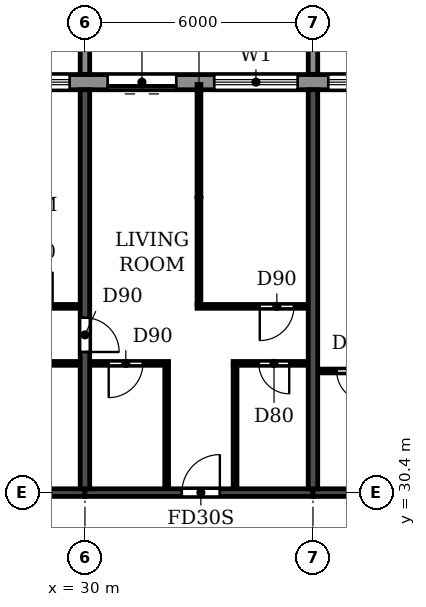
"""IFC4 building model, lengths in metres.
Left out: names, types, materials, properties, quantities, classifications, styles, units other than length and angle.
Written with IfcOpenShell. Run it as: python <this file> out.ifc"""

import sys

from ifc_helpers import new_model, si_unit, direction, frame, frame_2d, origin, place, context, subcontext, project, spatial, polyline, rectangle, outline, extrude, source, transform, mapped, element, fill, save


model = new_model("IFC4")
c1 = context("Model", 3, precision=1e-05, world=origin(), true_north=direction((0.0, 1.0)))
c2 = subcontext(c1, "Body", "Model", "MODEL_VIEW")
j1 = project(units=[si_unit("LENGTHUNIT", "METRE"), si_unit("PLANEANGLEUNIT", "RADIAN")], contexts=[c1])
p1 = place(None, origin())
s1 = spatial("IfcSite", under=j1, at=p1, CompositionType="ELEMENT")
p2 = place(p1, origin())
s2 = spatial("IfcBuilding", under=s1, at=p2, CompositionType="ELEMENT")
p3 = place(p2, frame((0.0, 0.0, 221.4)))
s3 = spatial("IfcBuildingStorey", under=s2, at=p3, CompositionType="ELEMENT", Elevation=221.4)
p4 = place(p3, frame((30.0, 30.5, 0.0), z_axis=(0.0, 0.0, 1.0), x_axis=(0.0, 1.0, 0.0)))
e1 = element("IfcWall", 1, at=p4, inside=s3, PredefinedType="SHEAR", context=c2, shape_type="SweptSolid", body=[
    extrude(rectangle(XDim=10.5, YDim=0.25, at=frame_2d((5.25, 0.0))), origin(), (0.0, 0.0, 1.0), 3.08),
])
p5 = place(p4, frame((3.6, 0.0, 0.0)))
e2 = element("IfcOpeningElement", 2, at=p5, cuts=e1, PredefinedType="OPENING", context=c2, shape_type="SweptSolid", body=[
    extrude(rectangle(XDim=0.9, YDim=2.1, at=frame_2d((0.45, 1.05))), frame((0.0, 0.135, 0.0), z_axis=(0.0, -1.0, 0.0), x_axis=(1.0, 0.0, 0.0)), (0.0, 0.0, 1.0), 0.27),
])
p6 = place(p3, frame((36.0, 30.5, 0.0), z_axis=(0.0, 0.0, 1.0), x_axis=(0.0, 1.0, 0.0)))
e3 = element("IfcWall", 3, at=p6, inside=s3, PredefinedType="SHEAR", context=c2, shape_type="SweptSolid", body=[
    extrude(rectangle(XDim=10.5, YDim=0.25, at=frame_2d((5.25, 0.0))), origin(), (0.0, 0.0, 1.0), 3.08),
])
p7 = place(p3, frame((24.0, 30.4, 0.0), z_axis=(0.0, 0.0, 1.0), x_axis=(1.0, 0.0, 0.0)))
e4 = element("IfcWall", 4, at=p7, inside=s3, PredefinedType="SHEAR", context=c2, shape_type="SweptSolid", body=[
    extrude(rectangle(XDim=6.0, YDim=0.2, at=frame_2d((3.0, 0.0))), origin(), (0.0, 0.0, 1.0), 2.48),
])
p8 = place(p3, frame((30.0, 30.4, 0.0), z_axis=(0.0, 0.0, 1.0), x_axis=(1.0, 0.0, 0.0)))
e5 = element("IfcWall", 5, at=p8, inside=s3, PredefinedType="SHEAR", context=c2, shape_type="SweptSolid", body=[
    extrude(rectangle(XDim=6.0, YDim=0.2, at=frame_2d((3.0, 0.0))), origin(), (0.0, 0.0, 1.0), 2.48),
])
p9 = place(p8, frame((2.55, 0.0, 0.0)))
e6 = element("IfcOpeningElement", 6, at=p9, cuts=e5, PredefinedType="OPENING", context=c2, shape_type="SweptSolid", body=[
    extrude(rectangle(XDim=1.0, YDim=2.1, at=frame_2d((0.5, 1.05))), frame((0.0, 0.11, 0.0), z_axis=(0.0, -1.0, 0.0), x_axis=(1.0, 0.0, 0.0)), (0.0, 0.0, 1.0), 0.22),
])
p10 = place(p3, frame((36.0, 30.4, 0.0), z_axis=(0.0, 0.0, 1.0), x_axis=(1.0, 0.0, 0.0)))
e7 = element("IfcWall", 7, at=p10, inside=s3, PredefinedType="SHEAR", context=c2, shape_type="SweptSolid", body=[
    extrude(rectangle(XDim=6.0, YDim=0.2, at=frame_2d((3.0, 0.0))), origin(), (0.0, 0.0, 1.0), 2.48),
])
p11 = place(p10, frame((2.45, 0.0, 0.0)))
e8 = element("IfcOpeningElement", 8, at=p11, cuts=e7, PredefinedType="OPENING", context=c2, shape_type="SweptSolid", body=[
    extrude(rectangle(XDim=1.0, YDim=2.1, at=frame_2d((0.5, 1.05))), frame((0.0, 0.11, 0.0), z_axis=(0.0, -1.0, 0.0), x_axis=(1.0, 0.0, 0.0)), (0.0, 0.0, 1.0), 0.22),
])
p12 = place(p3, frame((79.317, 41.2, 0.0), z_axis=(0.0, 0.0, 1.0), x_axis=(-1.0, 0.0, 0.0)))
e9 = element("IfcWall", 9, at=p12, inside=s3, PredefinedType="STANDARD", context=c2, shape_type="SweptSolid", body=[
    extrude(rectangle(XDim=56.634, YDim=0.4, at=frame_2d((28.317, 0.0))), origin(), (0.0, 0.0, 1.0), 3.08),
])
p13 = place(p12, frame((52.717, 0.0, 0.9)))
e10 = element("IfcOpeningElement", 10, at=p13, cuts=e9, PredefinedType="OPENING", context=c2, shape_type="SweptSolid", body=[
    extrude(rectangle(XDim=2.2, YDim=1.5, at=frame_2d((1.1, 0.75))), frame((0.0, 0.21, 0.0), z_axis=(0.0, -1.0, 0.0), x_axis=(1.0, 0.0, 0.0)), (0.0, 0.0, 1.0), 0.42),
])
p14 = place(p12, frame((49.717, 0.0, 0.9)))
e11 = element("IfcOpeningElement", 11, at=p14, cuts=e9, PredefinedType="OPENING", context=c2, shape_type="SweptSolid", body=[
    extrude(rectangle(XDim=2.2, YDim=1.5, at=frame_2d((1.1, 0.75))), frame((0.0, 0.21, 0.0), z_axis=(0.0, -1.0, 0.0), x_axis=(1.0, 0.0, 0.0)), (0.0, 0.0, 1.0), 0.42),
])
p15 = place(p12, frame((46.917, 0.0, 0.0)))
e12 = element("IfcOpeningElement", 12, at=p15, cuts=e9, PredefinedType="OPENING", context=c2, shape_type="SweptSolid", body=[
    extrude(rectangle(XDim=1.8, YDim=2.4, at=frame_2d((0.9, 1.2))), frame((0.0, 0.21, 0.0), z_axis=(0.0, -1.0, 0.0), x_axis=(1.0, 0.0, 0.0)), (0.0, 0.0, 1.0), 0.42),
])
p16 = place(p12, frame((43.717, 0.0, 0.9)))
e13 = element("IfcOpeningElement", 13, at=p16, cuts=e9, PredefinedType="OPENING", context=c2, shape_type="SweptSolid", body=[
    extrude(rectangle(XDim=2.2, YDim=1.5, at=frame_2d((1.1, 0.75))), frame((0.0, 0.21, 0.0), z_axis=(0.0, -1.0, 0.0), x_axis=(1.0, 0.0, 0.0)), (0.0, 0.0, 1.0), 0.42),
])
p17 = place(p12, frame((40.717, 0.0, 0.9)))
e14 = element("IfcOpeningElement", 14, at=p17, cuts=e9, PredefinedType="OPENING", context=c2, shape_type="SweptSolid", body=[
    extrude(rectangle(XDim=2.2, YDim=1.5, at=frame_2d((1.1, 0.75))), frame((0.0, 0.21, 0.0), z_axis=(0.0, -1.0, 0.0), x_axis=(1.0, 0.0, 0.0)), (0.0, 0.0, 1.0), 0.42),
])
p18 = place(p12, frame((37.917, 0.0, 0.0)))
e15 = element("IfcOpeningElement", 15, at=p18, cuts=e9, PredefinedType="OPENING", context=c2, shape_type="SweptSolid", body=[
    extrude(rectangle(XDim=1.8, YDim=2.4, at=frame_2d((0.9, 1.2))), frame((0.0, 0.21, 0.0), z_axis=(0.0, -1.0, 0.0), x_axis=(1.0, 0.0, 0.0)), (0.0, 0.0, 1.0), 0.42),
])
p19 = place(p12, frame((34.717, 0.0, 0.9)))
e16 = element("IfcOpeningElement", 16, at=p19, cuts=e9, PredefinedType="OPENING", context=c2, shape_type="SweptSolid", body=[
    extrude(rectangle(XDim=2.2, YDim=1.5, at=frame_2d((1.1, 0.75))), frame((0.0, 0.21, 0.0), z_axis=(0.0, -1.0, 0.0), x_axis=(1.0, 0.0, 0.0)), (0.0, 0.0, 1.0), 0.42),
])
p20 = place(p12, frame((31.717, 0.0, 0.9)))
e17 = element("IfcOpeningElement", 17, at=p20, cuts=e9, PredefinedType="OPENING", context=c2, shape_type="SweptSolid", body=[
    extrude(rectangle(XDim=2.2, YDim=1.5, at=frame_2d((1.1, 0.75))), frame((0.0, 0.21, 0.0), z_axis=(0.0, -1.0, 0.0), x_axis=(1.0, 0.0, 0.0)), (0.0, 0.0, 1.0), 0.42),
])
p21 = place(p12, frame((28.717, 0.0, 0.9)))
e18 = element("IfcOpeningElement", 18, at=p21, cuts=e9, PredefinedType="OPENING", context=c2, shape_type="SweptSolid", body=[
    extrude(rectangle(XDim=2.2, YDim=1.5, at=frame_2d((1.1, 0.75))), frame((0.0, 0.21, 0.0), z_axis=(0.0, -1.0, 0.0), x_axis=(1.0, 0.0, 0.0)), (0.0, 0.0, 1.0), 0.42),
])
p22 = place(p12, frame((25.917, 0.0, 0.0)))
e19 = element("IfcOpeningElement", 19, at=p22, cuts=e9, PredefinedType="OPENING", context=c2, shape_type="SweptSolid", body=[
    extrude(rectangle(XDim=1.8, YDim=2.4, at=frame_2d((0.9, 1.2))), frame((0.0, 0.21, 0.0), z_axis=(0.0, -1.0, 0.0), x_axis=(1.0, 0.0, 0.0)), (0.0, 0.0, 1.0), 0.42),
])
p23 = place(p12, frame((22.717, 0.0, 0.9)))
e20 = element("IfcOpeningElement", 20, at=p23, cuts=e9, PredefinedType="OPENING", context=c2, shape_type="SweptSolid", body=[
    extrude(rectangle(XDim=2.2, YDim=1.5, at=frame_2d((1.1, 0.75))), frame((0.0, 0.21, 0.0), z_axis=(0.0, -1.0, 0.0), x_axis=(1.0, 0.0, 0.0)), (0.0, 0.0, 1.0), 0.42),
])
p24 = place(p12, frame((19.717, 0.0, 0.9)))
e21 = element("IfcOpeningElement", 21, at=p24, cuts=e9, PredefinedType="OPENING", context=c2, shape_type="SweptSolid", body=[
    extrude(rectangle(XDim=2.2, YDim=1.5, at=frame_2d((1.1, 0.75))), frame((0.0, 0.21, 0.0), z_axis=(0.0, -1.0, 0.0), x_axis=(1.0, 0.0, 0.0)), (0.0, 0.0, 1.0), 0.42),
])
p25 = place(p12, frame((16.717, 0.0, 0.9)))
e22 = element("IfcOpeningElement", 22, at=p25, cuts=e9, PredefinedType="OPENING", context=c2, shape_type="SweptSolid", body=[
    extrude(rectangle(XDim=2.2, YDim=1.5, at=frame_2d((1.1, 0.75))), frame((0.0, 0.21, 0.0), z_axis=(0.0, -1.0, 0.0), x_axis=(1.0, 0.0, 0.0)), (0.0, 0.0, 1.0), 0.42),
])
p26 = place(p12, frame((13.917, 0.0, 0.0)))
e23 = element("IfcOpeningElement", 23, at=p26, cuts=e9, PredefinedType="OPENING", context=c2, shape_type="SweptSolid", body=[
    extrude(rectangle(XDim=1.8, YDim=2.4, at=frame_2d((0.9, 1.2))), frame((0.0, 0.21, 0.0), z_axis=(0.0, -1.0, 0.0), x_axis=(1.0, 0.0, 0.0)), (0.0, 0.0, 1.0), 0.42),
])
p27 = place(p12, frame((10.717, 0.0, 0.9)))
e24 = element("IfcOpeningElement", 24, at=p27, cuts=e9, PredefinedType="OPENING", context=c2, shape_type="SweptSolid", body=[
    extrude(rectangle(XDim=2.2, YDim=1.5, at=frame_2d((1.1, 0.75))), frame((0.0, 0.21, 0.0), z_axis=(0.0, -1.0, 0.0), x_axis=(1.0, 0.0, 0.0)), (0.0, 0.0, 1.0), 0.42),
])
p28 = place(p12, frame((7.917, 0.0, 0.0)))
e25 = element("IfcOpeningElement", 25, at=p28, cuts=e9, PredefinedType="OPENING", context=c2, shape_type="SweptSolid", body=[
    extrude(rectangle(XDim=1.8, YDim=2.4, at=frame_2d((0.9, 1.2))), frame((0.0, 0.21, 0.0), z_axis=(0.0, -1.0, 0.0), x_axis=(1.0, 0.0, 0.0)), (0.0, 0.0, 1.0), 0.42),
])
p29 = place(p12, frame((4.717, 0.0, 0.9)))
e26 = element("IfcOpeningElement", 26, at=p29, cuts=e9, PredefinedType="OPENING", context=c2, shape_type="SweptSolid", body=[
    extrude(rectangle(XDim=2.2, YDim=1.5, at=frame_2d((1.1, 0.75))), frame((0.0, 0.21, 0.0), z_axis=(0.0, -1.0, 0.0), x_axis=(1.0, 0.0, 0.0)), (0.0, 0.0, 1.0), 0.42),
])
p30 = place(p12, frame((1.917, 0.0, 0.0)))
e27 = element("IfcOpeningElement", 27, at=p30, cuts=e9, PredefinedType="OPENING", context=c2, shape_type="SweptSolid", body=[
    extrude(rectangle(XDim=1.8, YDim=2.4, at=frame_2d((0.9, 1.2))), frame((0.0, 0.21, 0.0), z_axis=(0.0, -1.0, 0.0), x_axis=(1.0, 0.0, 0.0)), (0.0, 0.0, 1.0), 0.42),
])
m1 = source(origin(), c2, "Body", "SweptSolid", [
    extrude(outline(polyline([(0.0, 0.0), (0.25, 0.0), (0.25, 3.1), (0.0, 3.1), (0.0, 0.0)])), origin(), (0.0, 0.0, 1.0), 3.1),
])
for number, where in (
    (28, (29.875, 41.4, 0.0)),
    (29, (35.875, 41.4, 0.0)),
):
    element("IfcWall", number, at=place(p3, frame(where)), inside=s3, PredefinedType="STANDARD", context=c2, shape_type="MappedRepresentation", body=[
        mapped(m1, transform((0.0, 0.0, 0.0))),
    ])
p31 = place(p3, frame((36.135, 33.6, 0.0), z_axis=(0.0, 0.0, 1.0), x_axis=(1.0, 0.0, 0.0)))
e30 = element("IfcWall", 30, at=p31, inside=s3, PredefinedType="PARTITIONING", context=c2, shape_type="SweptSolid", body=[
    extrude(rectangle(XDim=1.965, YDim=0.1, at=frame_2d((0.982, 0.0))), origin(), (0.0, 0.0, 1.0), 3.08),
])
p32 = place(p31, frame((0.49, 0.0, 0.0)))
e31 = element("IfcOpeningElement", 31, at=p32, cuts=e30, PredefinedType="OPENING", context=c2, shape_type="SweptSolid", body=[
    extrude(rectangle(XDim=0.8, YDim=2.1, at=frame_2d((0.4, 1.05))), frame((0.0, 0.06, 0.0), z_axis=(0.0, -1.0, 0.0), x_axis=(1.0, 0.0, 0.0)), (0.0, 0.0, 1.0), 0.12),
])
p33 = place(p3, frame((26.65, 33.8, 0.0), z_axis=(0.0, 0.0, 1.0), x_axis=(1.0, 0.0, 0.0)))
e32 = element("IfcWall", 32, at=p33, inside=s3, PredefinedType="PARTITIONING", context=c2, shape_type="SweptSolid", body=[
    extrude(rectangle(XDim=3.215, YDim=0.1, at=frame_2d((1.607, 0.0))), origin(), (0.0, 0.0, 1.0), 3.08),
])
p34 = place(p33, frame((1.3, 0.0, 0.0)))
e33 = element("IfcOpeningElement", 33, at=p34, cuts=e32, PredefinedType="OPENING", context=c2, shape_type="SweptSolid", body=[
    extrude(rectangle(XDim=0.8, YDim=2.1, at=frame_2d((0.4, 1.05))), frame((0.0, 0.06, 0.0), z_axis=(0.0, -1.0, 0.0), x_axis=(1.0, 0.0, 0.0)), (0.0, 0.0, 1.0), 0.12),
])
p35 = place(p3, frame((30.135, 33.8, 0.0), z_axis=(0.0, 0.0, 1.0), x_axis=(1.0, 0.0, 0.0)))
e34 = element("IfcWall", 34, at=p35, inside=s3, PredefinedType="PARTITIONING", context=c2, shape_type="SweptSolid", body=[
    extrude(rectangle(XDim=2.065, YDim=0.1, at=frame_2d((1.032, 0.0))), origin(), (0.0, 0.0, 1.0), 3.08),
])
p36 = place(p35, frame((0.49, 0.0, 0.0)))
e35 = element("IfcOpeningElement", 35, at=p36, cuts=e34, PredefinedType="OPENING", context=c2, shape_type="SweptSolid", body=[
    extrude(rectangle(XDim=0.9, YDim=2.1, at=frame_2d((0.45, 1.05))), frame((0.0, 0.06, 0.0), z_axis=(0.0, -1.0, 0.0), x_axis=(1.0, 0.0, 0.0)), (0.0, 0.0, 1.0), 0.12),
])
p37 = place(p3, frame((33.9, 33.8, 0.0), z_axis=(0.0, 0.0, 1.0), x_axis=(1.0, 0.0, 0.0)))
e36 = element("IfcWall", 36, at=p37, inside=s3, PredefinedType="PARTITIONING", context=c2, shape_type="SweptSolid", body=[
    extrude(rectangle(XDim=1.965, YDim=0.1, at=frame_2d((0.982, 0.0))), origin(), (0.0, 0.0, 1.0), 3.08),
])
p38 = place(p37, frame((0.675, 0.0, 0.0)))
e37 = element("IfcOpeningElement", 37, at=p38, cuts=e36, PredefinedType="OPENING", context=c2, shape_type="SweptSolid", body=[
    extrude(rectangle(XDim=0.8, YDim=2.1, at=frame_2d((0.4, 1.05))), frame((0.0, 0.06, 0.0), z_axis=(0.0, -1.0, 0.0), x_axis=(1.0, 0.0, 0.0)), (0.0, 0.0, 1.0), 0.12),
])
p39 = place(p3, frame((24.135, 35.3, 0.0), z_axis=(0.0, 0.0, 1.0), x_axis=(1.0, 0.0, 0.0)))
e38 = element("IfcWall", 38, at=p39, inside=s3, PredefinedType="PARTITIONING", context=c2, shape_type="SweptSolid", body=[
    extrude(rectangle(XDim=5.73, YDim=0.1, at=frame_2d((2.865, 0.0))), origin(), (0.0, 0.0, 1.0), 3.08),
])
p40 = place(p39, frame((4.115, 0.0, 0.0)))
e39 = element("IfcOpeningElement", 39, at=p40, cuts=e38, PredefinedType="OPENING", context=c2, shape_type="SweptSolid", body=[
    extrude(rectangle(XDim=0.9, YDim=2.1, at=frame_2d((0.45, 1.05))), frame((0.0, 0.06, 0.0), z_axis=(0.0, -1.0, 0.0), x_axis=(1.0, 0.0, 0.0)), (0.0, 0.0, 1.0), 0.12),
])
p41 = place(p3, frame((32.95, 35.3, 0.0), z_axis=(0.0, 0.0, 1.0), x_axis=(1.0, 0.0, 0.0)))
e40 = element("IfcWall", 40, at=p41, inside=s3, PredefinedType="PARTITIONING", context=c2, shape_type="SweptSolid", body=[
    extrude(rectangle(XDim=2.915, YDim=0.1, at=frame_2d((1.458, 0.0))), origin(), (0.0, 0.0, 1.0), 3.08),
])
p42 = place(p41, frame((1.65, 0.0, 0.0)))
e41 = element("IfcOpeningElement", 41, at=p42, cuts=e40, PredefinedType="OPENING", context=c2, shape_type="SweptSolid", body=[
    extrude(rectangle(XDim=0.9, YDim=2.1, at=frame_2d((0.45, 1.05))), frame((0.0, 0.06, 0.0), z_axis=(0.0, -1.0, 0.0), x_axis=(1.0, 0.0, 0.0)), (0.0, 0.0, 1.0), 0.12),
])
p43 = place(p3, frame((32.15, 30.51, 0.0), z_axis=(0.0, 0.0, 1.0), x_axis=(0.0, 1.0, 0.0)))
e42 = element("IfcWall", 42, at=p43, inside=s3, PredefinedType="PARTITIONING", context=c2, shape_type="SweptSolid", body=[
    extrude(rectangle(XDim=3.24, YDim=0.1, at=frame_2d((1.62, 0.0))), origin(), (0.0, 0.0, 1.0), 3.08),
])
p44 = place(p3, frame((33.0, 35.35, 0.0), z_axis=(0.0, 0.0, 1.0), x_axis=(0.0, 1.0, 0.0)))
e43 = element("IfcWall", 43, at=p44, inside=s3, PredefinedType="PARTITIONING", context=c2, shape_type="SweptSolid", body=[
    extrude(rectangle(XDim=5.79, YDim=0.1, at=frame_2d((2.895, 0.0))), origin(), (0.0, 0.0, 1.0), 3.08),
])
p45 = place(p3, frame((33.95, 30.51, 0.0), z_axis=(0.0, 0.0, 1.0), x_axis=(0.0, 1.0, 0.0)))
e44 = element("IfcWall", 44, at=p45, inside=s3, PredefinedType="PARTITIONING", context=c2, shape_type="SweptSolid", body=[
    extrude(rectangle(XDim=3.24, YDim=0.1, at=frame_2d((1.62, 0.0))), origin(), (0.0, 0.0, 1.0), 3.08),
])
p46 = place(p14, origin())
e45 = element("IfcWindow", 45, at=p46, inside=s3, PartitioningType="DOUBLE_PANEL_HORIZONTAL", PredefinedType="WINDOW", context=c2, shape_type="SweptSolid", body=[
    extrude(rectangle(XDim=2.2, YDim=1.5, at=frame_2d((1.1, 0.75))), frame((0.0, 0.03, 0.0), z_axis=(0.0, -1.0, 0.0), x_axis=(1.0, 0.0, 0.0)), (0.0, 0.0, 1.0), 0.06),
])
fill(e11, e45)
p47 = place(p15, origin())
e46 = element("IfcDoor", 46, at=p47, inside=s3, OperationType="DOUBLE_DOOR_SLIDING", PredefinedType="DOOR", context=c2, shape_type="SweptSolid", body=[
    extrude(rectangle(XDim=1.8, YDim=2.4, at=frame_2d((0.9, 1.2))), frame((0.0, 0.025, 0.0), z_axis=(0.0, -1.0, 0.0), x_axis=(1.0, 0.0, 0.0)), (0.0, 0.0, 1.0), 0.05),
])
fill(e12, e46)
p48 = place(p16, origin())
e47 = element("IfcWindow", 47, at=p48, inside=s3, PartitioningType="DOUBLE_PANEL_HORIZONTAL", PredefinedType="WINDOW", context=c2, shape_type="SweptSolid", body=[
    extrude(rectangle(XDim=2.2, YDim=1.5, at=frame_2d((1.1, 0.75))), frame((0.0, 0.03, 0.0), z_axis=(0.0, -1.0, 0.0), x_axis=(1.0, 0.0, 0.0)), (0.0, 0.0, 1.0), 0.06),
])
fill(e13, e47)
p49 = place(p17, origin())
e48 = element("IfcWindow", 48, at=p49, inside=s3, PartitioningType="DOUBLE_PANEL_HORIZONTAL", PredefinedType="WINDOW", context=c2, shape_type="SweptSolid", body=[
    extrude(rectangle(XDim=2.2, YDim=1.5, at=frame_2d((1.1, 0.75))), frame((0.0, 0.03, 0.0), z_axis=(0.0, -1.0, 0.0), x_axis=(1.0, 0.0, 0.0)), (0.0, 0.0, 1.0), 0.06),
])
fill(e14, e48)
p50 = place(p40, origin())
e49 = element("IfcDoor", 49, at=p50, inside=s3, OperationType="SINGLE_SWING_RIGHT", PredefinedType="DOOR", context=c2, shape_type="SweptSolid", body=[
    extrude(rectangle(XDim=0.9, YDim=2.1, at=frame_2d((0.45, 1.05))), frame((0.0, 0.025, 0.0), z_axis=(0.0, -1.0, 0.0), x_axis=(1.0, 0.0, 0.0)), (0.0, 0.0, 1.0), 0.05),
])
fill(e39, e49)
p51 = place(p5, frame((0.9, 0.0, 0.0), z_axis=(0.0, 0.0, 1.0), x_axis=(-1.0, 0.0, 0.0)))
e50 = element("IfcDoor", 50, at=p51, inside=s3, OperationType="SINGLE_SWING_RIGHT", PredefinedType="DOOR", context=c2, shape_type="SweptSolid", body=[
    extrude(rectangle(XDim=0.9, YDim=2.1, at=frame_2d((0.45, 1.05))), frame((0.0, 0.025, 0.0), z_axis=(0.0, -1.0, 0.0), x_axis=(1.0, 0.0, 0.0)), (0.0, 0.0, 1.0), 0.05),
])
fill(e2, e50)
p52 = place(p36, frame((0.9, 0.0, 0.0), z_axis=(0.0, 0.0, 1.0), x_axis=(-1.0, 0.0, 0.0)))
e51 = element("IfcDoor", 51, at=p52, inside=s3, OperationType="SINGLE_SWING_RIGHT", PredefinedType="DOOR", context=c2, shape_type="SweptSolid", body=[
    extrude(rectangle(XDim=0.9, YDim=2.1, at=frame_2d((0.45, 1.05))), frame((0.0, 0.025, 0.0), z_axis=(0.0, -1.0, 0.0), x_axis=(1.0, 0.0, 0.0)), (0.0, 0.0, 1.0), 0.05),
])
fill(e35, e51)
p53 = place(p9, origin())
e52 = element("IfcDoor", 52, at=p53, inside=s3, OperationType="SINGLE_SWING_RIGHT", PredefinedType="DOOR", context=c2, shape_type="SweptSolid", body=[
    extrude(rectangle(XDim=1.0, YDim=2.1, at=frame_2d((0.5, 1.05))), frame((0.0, 0.025, 0.0), z_axis=(0.0, -1.0, 0.0), x_axis=(1.0, 0.0, 0.0)), (0.0, 0.0, 1.0), 0.05),
])
fill(e6, e52)
p54 = place(p38, frame((0.8, 0.0, 0.0), z_axis=(0.0, 0.0, 1.0), x_axis=(-1.0, 0.0, 0.0)))
e53 = element("IfcDoor", 53, at=p54, inside=s3, OperationType="SINGLE_SWING_LEFT", PredefinedType="DOOR", context=c2, shape_type="SweptSolid", body=[
    extrude(rectangle(XDim=0.8, YDim=2.1, at=frame_2d((0.4, 1.05))), frame((0.0, 0.025, 0.0), z_axis=(0.0, -1.0, 0.0), x_axis=(1.0, 0.0, 0.0)), (0.0, 0.0, 1.0), 0.05),
])
fill(e37, e53)
p55 = place(p42, frame((0.9, 0.0, 0.0), z_axis=(0.0, 0.0, 1.0), x_axis=(-1.0, 0.0, 0.0)))
e54 = element("IfcDoor", 54, at=p55, inside=s3, OperationType="SINGLE_SWING_RIGHT", PredefinedType="DOOR", context=c2, shape_type="SweptSolid", body=[
    extrude(rectangle(XDim=0.9, YDim=2.1, at=frame_2d((0.45, 1.05))), frame((0.0, 0.025, 0.0), z_axis=(0.0, -1.0, 0.0), x_axis=(1.0, 0.0, 0.0)), (0.0, 0.0, 1.0), 0.05),
])
fill(e41, e54)
p56 = place(p32, frame((0.8, 0.0, 0.0), z_axis=(0.0, 0.0, 1.0), x_axis=(-1.0, 0.0, 0.0)))
e55 = element("IfcDoor", 55, at=p56, inside=s3, OperationType="SINGLE_SWING_LEFT", PredefinedType="DOOR", context=c2, shape_type="SweptSolid", body=[
    extrude(rectangle(XDim=0.8, YDim=2.1, at=frame_2d((0.4, 1.05))), frame((0.0, 0.025, 0.0), z_axis=(0.0, -1.0, 0.0), x_axis=(1.0, 0.0, 0.0)), (0.0, 0.0, 1.0), 0.05),
])
fill(e31, e55)
save(model, sys.argv[1])
